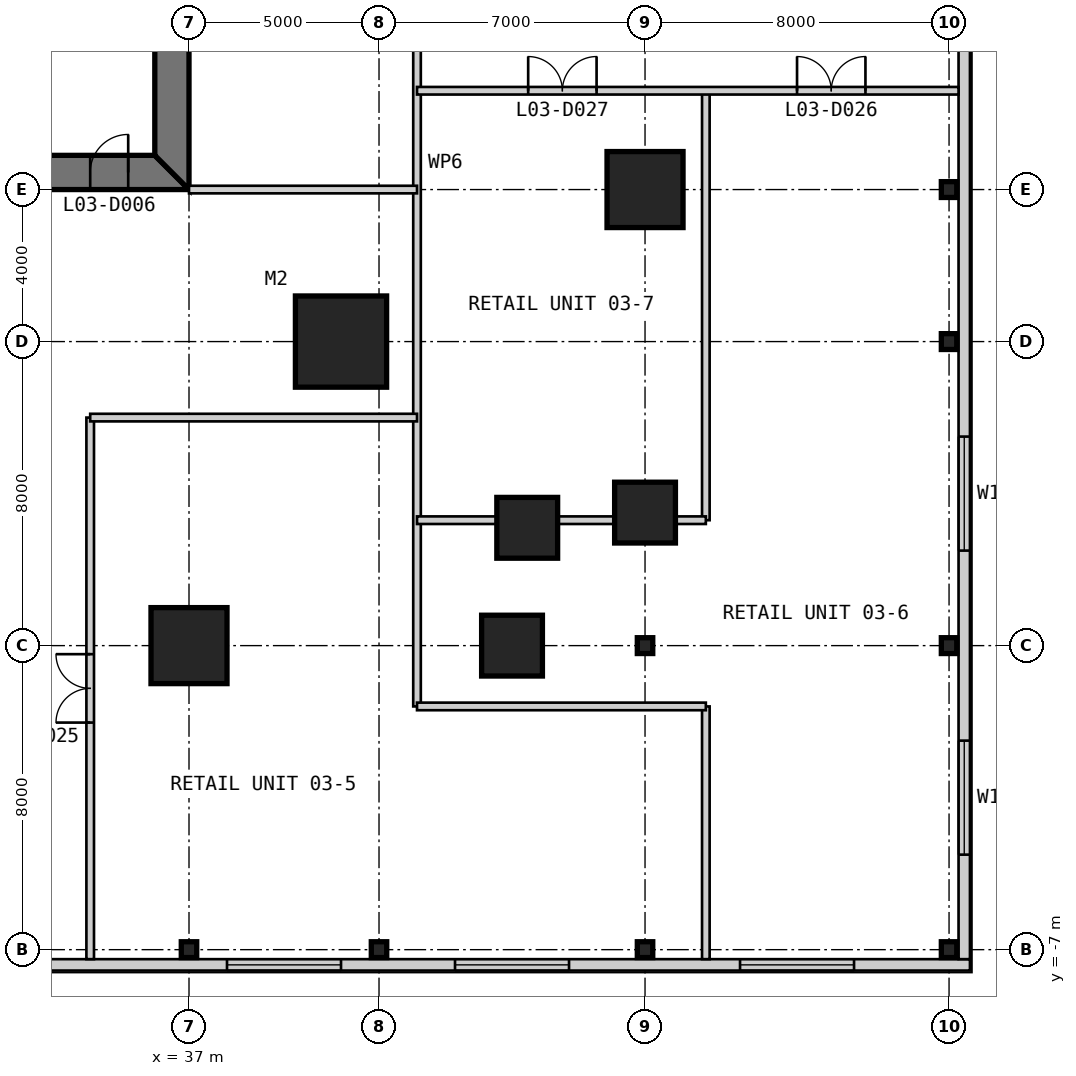
"""IFC4 building model, lengths in metres.
Left out: names, types, materials, properties, quantities, classifications, styles, units other than length and angle.
Written with IfcOpenShell. Run it as: python <this file> out.ifc"""

import sys

from ifc_helpers import new_model, si_unit, direction, frame, frame_2d, origin, origin_2d, place, context, subcontext, project, spatial, polyline, rectangle, i_section, outline, extrude, element, fill, save


model = new_model("IFC4")
c1 = context("Model", 3, precision=1e-05, world=origin(), true_north=direction((0.0, 1.0)))
c2 = subcontext(c1, "Body", "Model", "MODEL_VIEW")
j1 = project(units=[si_unit("LENGTHUNIT", "METRE"), si_unit("PLANEANGLEUNIT", "RADIAN")], contexts=[c1])
p1 = place(None, origin())
s1 = spatial("IfcSite", under=j1, at=p1, CompositionType="ELEMENT")
p2 = place(p1, origin())
s2 = spatial("IfcBuilding", under=s1, at=p2, CompositionType="ELEMENT")
p3 = place(p2, frame((0.0, 0.0, 16.6)))
s3 = spatial("IfcBuildingStorey", under=s2, at=p3, CompositionType="ELEMENT", Elevation=16.6)
p4 = place(p3, frame((41.0, 9.0, 0.0), z_axis=(0.0, 0.0, 1.0), x_axis=(1.0, 0.0, 0.0)))
e1 = element("IfcColumn", 1, at=p4, inside=s3, PredefinedType="COLUMN", context=c2, shape_type="SweptSolid", body=[
    extrude(rectangle(XDim=2.4, YDim=2.4, at=origin_2d()), origin(), (0.0, 0.0, 1.0), 4.8),
])
p5 = place(p3, frame((37.0, 1.0, 0.0), z_axis=(0.0, 0.0, 1.0), x_axis=(1.0, 0.0, 0.0)))
e2 = element("IfcColumn", 2, at=p5, inside=s3, PredefinedType="COLUMN", context=c2, shape_type="SweptSolid", body=[
    extrude(rectangle(XDim=2.0, YDim=2.0, at=origin_2d()), origin(), (0.0, 0.0, 1.0), 4.8),
])
for number, where, z_axis, x_axis in (
    (3, (45.5, 1.0, 0.0), (0.0, 0.0, 1.0), (1.0, 0.0, 0.0)),
    (4, (45.9, 4.1, 0.0), (0.0, 0.0, 1.0), (1.0, 0.0, 0.0)),
    (5, (49.0, 4.5, 0.0), (0.0, 0.0, 1.0), (1.0, 0.0, 0.0)),
):
    element("IfcColumn", number, at=place(p3, frame(where, z_axis=z_axis, x_axis=x_axis)), inside=s3, PredefinedType="COLUMN", context=c2, shape_type="SweptSolid", body=[
        extrude(rectangle(XDim=1.6, YDim=1.6, at=origin_2d()), origin(), (0.0, 0.0, 1.0), 4.8),
    ])
p6 = place(p3, frame((49.0, 13.0, 0.0), z_axis=(0.0, 0.0, 1.0), x_axis=(1.0, 0.0, 0.0)))
e6 = element("IfcColumn", 6, at=p6, inside=s3, PredefinedType="COLUMN", context=c2, shape_type="SweptSolid", body=[
    extrude(rectangle(XDim=2.0, YDim=2.0, at=origin_2d()), origin(), (0.0, 0.0, 1.0), 4.8),
])
for number, where, z_axis, x_axis in (
    (7, (37.0, -7.0, 0.0), (0.0, 0.0, 1.0), (1.0, 0.0, 0.0)),
    (8, (42.0, -7.0, 0.0), (0.0, 0.0, 1.0), (1.0, 0.0, 0.0)),
    (9, (49.0, -7.0, 0.0), (0.0, 0.0, 1.0), (1.0, 0.0, 0.0)),
    (10, (49.0, 1.0, 0.0), (0.0, 0.0, 1.0), (1.0, 0.0, 0.0)),
    (11, (57.0, -7.0, 0.0), (0.0, 0.0, 1.0), (1.0, 0.0, 0.0)),
    (12, (57.0, 1.0, 0.0), (0.0, 0.0, 1.0), (1.0, 0.0, 0.0)),
    (13, (57.0, 9.0, 0.0), (0.0, 0.0, 1.0), (1.0, 0.0, 0.0)),
    (14, (57.0, 13.0, 0.0), (0.0, 0.0, 1.0), (1.0, 0.0, 0.0)),
):
    element("IfcColumn", number, at=place(p3, frame(where, z_axis=z_axis, x_axis=x_axis)), inside=s3, PredefinedType="COLUMN", context=c2, shape_type="SweptSolid", body=[
        extrude(i_section(OverallWidth=0.406, OverallDepth=0.417, WebThickness=0.03, FlangeThickness=0.048, at=origin_2d()), origin(), (0.0, 0.0, 1.0), 4.8),
    ])
p7 = place(p3, frame((13.0, 13.45, 0.0), z_axis=(0.0, 0.0, 1.0), x_axis=(1.0, 0.0, 0.0)))
e15 = element("IfcWall", 15, at=p7, inside=s3, PredefinedType="SHEAR", context=c2, shape_type="SweptSolid", body=[
    extrude(outline(polyline([(0.0, -0.45), (24.0, -0.45), (23.1, 0.45), (0.9, 0.45), (0.0, -0.45)])), origin(), (0.0, 0.0, 1.0), 4.8),
])
p8 = place(p7, frame((4.9, 0.0, 0.0)))
e16 = element("IfcOpeningElement", 16, at=p8, cuts=e15, PredefinedType="OPENING", context=c2, shape_type="SweptSolid", body=[
    extrude(rectangle(XDim=1.0, YDim=2.2, at=frame_2d((0.5, 1.1))), frame((0.0, 0.46, 0.0), z_axis=(0.0, -1.0, 0.0), x_axis=(1.0, 0.0, 0.0)), (0.0, 0.0, 1.0), 0.92),
])
p9 = place(p7, frame((8.9, 0.0, 0.0)))
e17 = element("IfcOpeningElement", 17, at=p9, cuts=e15, PredefinedType="OPENING", context=c2, shape_type="SweptSolid", body=[
    extrude(rectangle(XDim=1.1, YDim=2.2, at=frame_2d((0.55, 1.1))), frame((0.0, 0.46, 0.0), z_axis=(0.0, -1.0, 0.0), x_axis=(1.0, 0.0, 0.0)), (0.0, 0.0, 1.0), 0.92),
])
p10 = place(p7, frame((15.05, 0.0, 0.0)))
e18 = element("IfcOpeningElement", 18, at=p10, cuts=e15, PredefinedType="OPENING", context=c2, shape_type="SweptSolid", body=[
    extrude(rectangle(XDim=0.9, YDim=2.2, at=frame_2d((0.45, 1.1))), frame((0.0, 0.46, 0.0), z_axis=(0.0, -1.0, 0.0), x_axis=(1.0, 0.0, 0.0)), (0.0, 0.0, 1.0), 0.92),
])
p11 = place(p7, frame((17.9, 0.0, 0.0)))
e19 = element("IfcOpeningElement", 19, at=p11, cuts=e15, PredefinedType="OPENING", context=c2, shape_type="SweptSolid", body=[
    extrude(rectangle(XDim=1.0, YDim=2.2, at=frame_2d((0.5, 1.1))), frame((0.0, 0.46, 0.0), z_axis=(0.0, -1.0, 0.0), x_axis=(1.0, 0.0, 0.0)), (0.0, 0.0, 1.0), 0.92),
])
p12 = place(p7, frame((21.4, 0.0, 0.0)))
e20 = element("IfcOpeningElement", 20, at=p12, cuts=e15, PredefinedType="OPENING", context=c2, shape_type="SweptSolid", body=[
    extrude(rectangle(XDim=1.0, YDim=2.2, at=frame_2d((0.5, 1.1))), frame((0.0, 0.46, 0.0), z_axis=(0.0, -1.0, 0.0), x_axis=(1.0, 0.0, 0.0)), (0.0, 0.0, 1.0), 0.92),
])
p13 = place(p3, frame((36.55, 13.9, 0.0), z_axis=(0.0, 0.0, 1.0), x_axis=(0.0, 1.0, 0.0)))
e21 = element("IfcWall", 21, at=p13, inside=s3, PredefinedType="SHEAR", context=c2, shape_type="SweptSolid", body=[
    extrude(outline(polyline([(-0.9, -0.45), (23.1, -0.45), (22.2, 0.45), (0.0, 0.45), (-0.9, -0.45)])), origin(), (0.0, 0.0, 1.0), 4.8),
])
p14 = place(p13, frame((20.2, 0.0, 0.0)))
e22 = element("IfcOpeningElement", 22, at=p14, cuts=e21, PredefinedType="OPENING", context=c2, shape_type="SweptSolid", body=[
    extrude(rectangle(XDim=1.0, YDim=2.2, at=frame_2d((0.5, 1.1))), frame((0.0, 0.46, 0.0), z_axis=(0.0, -1.0, 0.0), x_axis=(1.0, 0.0, 0.0)), (0.0, 0.0, 1.0), 0.92),
])
p15 = place(p13, frame((17.25, 0.0, 0.0)))
e23 = element("IfcOpeningElement", 23, at=p15, cuts=e21, PredefinedType="OPENING", context=c2, shape_type="SweptSolid", body=[
    extrude(rectangle(XDim=0.9, YDim=2.2, at=frame_2d((0.45, 1.1))), frame((0.0, 0.46, 0.0), z_axis=(0.0, -1.0, 0.0), x_axis=(1.0, 0.0, 0.0)), (0.0, 0.0, 1.0), 0.92),
])
p16 = place(p3, frame((-15.55, -7.4, 0.0), z_axis=(0.0, 0.0, 1.0), x_axis=(1.0, 0.0, 0.0)))
e24 = element("IfcWall", 24, at=p16, inside=s3, PredefinedType="SOLIDWALL", context=c2, shape_type="SweptSolid", body=[
    extrude(rectangle(XDim=73.1, YDim=0.3, at=frame_2d((36.55, 0.0))), origin(), (0.0, 0.0, 1.0), 4.5),
])
p17 = place(p16, frame((3.05, 0.0, 0.9)))
e25 = element("IfcOpeningElement", 25, at=p17, cuts=e24, PredefinedType="OPENING", context=c2, shape_type="SweptSolid", body=[
    extrude(rectangle(XDim=3.0, YDim=2.4, at=frame_2d((1.5, 1.2))), frame((0.0, 0.16, 0.0), z_axis=(0.0, -1.0, 0.0), x_axis=(1.0, 0.0, 0.0)), (0.0, 0.0, 1.0), 0.32),
])
p18 = place(p16, frame((11.05, 0.0, 0.9)))
e26 = element("IfcOpeningElement", 26, at=p18, cuts=e24, PredefinedType="OPENING", context=c2, shape_type="SweptSolid", body=[
    extrude(rectangle(XDim=3.0, YDim=2.4, at=frame_2d((1.5, 1.2))), frame((0.0, 0.16, 0.0), z_axis=(0.0, -1.0, 0.0), x_axis=(1.0, 0.0, 0.0)), (0.0, 0.0, 1.0), 0.32),
])
p19 = place(p16, frame((19.05, 0.0, 0.9)))
e27 = element("IfcOpeningElement", 27, at=p19, cuts=e24, PredefinedType="OPENING", context=c2, shape_type="SweptSolid", body=[
    extrude(rectangle(XDim=3.0, YDim=2.4, at=frame_2d((1.5, 1.2))), frame((0.0, 0.16, 0.0), z_axis=(0.0, -1.0, 0.0), x_axis=(1.0, 0.0, 0.0)), (0.0, 0.0, 1.0), 0.32),
])
p20 = place(p16, frame((33.05, 0.0, 0.9)))
e28 = element("IfcOpeningElement", 28, at=p20, cuts=e24, PredefinedType="OPENING", context=c2, shape_type="SweptSolid", body=[
    extrude(rectangle(XDim=3.0, YDim=2.4, at=frame_2d((1.5, 1.2))), frame((0.0, 0.16, 0.0), z_axis=(0.0, -1.0, 0.0), x_axis=(1.0, 0.0, 0.0)), (0.0, 0.0, 1.0), 0.32),
])
p21 = place(p16, frame((45.05, 0.0, 0.9)))
e29 = element("IfcOpeningElement", 29, at=p21, cuts=e24, PredefinedType="OPENING", context=c2, shape_type="SweptSolid", body=[
    extrude(rectangle(XDim=3.0, YDim=2.4, at=frame_2d((1.5, 1.2))), frame((0.0, 0.16, 0.0), z_axis=(0.0, -1.0, 0.0), x_axis=(1.0, 0.0, 0.0)), (0.0, 0.0, 1.0), 0.32),
])
p22 = place(p16, frame((53.55, 0.0, 0.9)))
e30 = element("IfcOpeningElement", 30, at=p22, cuts=e24, PredefinedType="OPENING", context=c2, shape_type="SweptSolid", body=[
    extrude(rectangle(XDim=3.0, YDim=2.4, at=frame_2d((1.5, 1.2))), frame((0.0, 0.16, 0.0), z_axis=(0.0, -1.0, 0.0), x_axis=(1.0, 0.0, 0.0)), (0.0, 0.0, 1.0), 0.32),
])
p23 = place(p16, frame((59.55, 0.0, 0.9)))
e31 = element("IfcOpeningElement", 31, at=p23, cuts=e24, PredefinedType="OPENING", context=c2, shape_type="SweptSolid", body=[
    extrude(rectangle(XDim=3.0, YDim=2.4, at=frame_2d((1.5, 1.2))), frame((0.0, 0.16, 0.0), z_axis=(0.0, -1.0, 0.0), x_axis=(1.0, 0.0, 0.0)), (0.0, 0.0, 1.0), 0.32),
])
p24 = place(p16, frame((67.05, 0.0, 0.9)))
e32 = element("IfcOpeningElement", 32, at=p24, cuts=e24, PredefinedType="OPENING", context=c2, shape_type="SweptSolid", body=[
    extrude(rectangle(XDim=3.0, YDim=2.4, at=frame_2d((1.5, 1.2))), frame((0.0, 0.16, 0.0), z_axis=(0.0, -1.0, 0.0), x_axis=(1.0, 0.0, 0.0)), (0.0, 0.0, 1.0), 0.32),
])
p25 = place(p3, frame((57.4, -7.25, 0.0), z_axis=(0.0, 0.0, 1.0), x_axis=(0.0, 1.0, 0.0)))
e33 = element("IfcWall", 33, at=p25, inside=s3, PredefinedType="SOLIDWALL", context=c2, shape_type="SweptSolid", body=[
    extrude(rectangle(XDim=72.5, YDim=0.3, at=frame_2d((36.25, 0.0))), origin(), (0.0, 0.0, 1.0), 4.5),
])
p26 = place(p25, frame((2.75, 0.0, 0.9)))
e34 = element("IfcOpeningElement", 34, at=p26, cuts=e33, PredefinedType="OPENING", context=c2, shape_type="SweptSolid", body=[
    extrude(rectangle(XDim=3.0, YDim=2.4, at=frame_2d((1.5, 1.2))), frame((0.0, 0.16, 0.0), z_axis=(0.0, -1.0, 0.0), x_axis=(1.0, 0.0, 0.0)), (0.0, 0.0, 1.0), 0.32),
])
p27 = place(p25, frame((10.75, 0.0, 0.9)))
e35 = element("IfcOpeningElement", 35, at=p27, cuts=e33, PredefinedType="OPENING", context=c2, shape_type="SweptSolid", body=[
    extrude(rectangle(XDim=3.0, YDim=2.4, at=frame_2d((1.5, 1.2))), frame((0.0, 0.16, 0.0), z_axis=(0.0, -1.0, 0.0), x_axis=(1.0, 0.0, 0.0)), (0.0, 0.0, 1.0), 0.32),
])
p28 = place(p25, frame((24.75, 0.0, 0.9)))
e36 = element("IfcOpeningElement", 36, at=p28, cuts=e33, PredefinedType="OPENING", context=c2, shape_type="SweptSolid", body=[
    extrude(rectangle(XDim=3.0, YDim=2.4, at=frame_2d((1.5, 1.2))), frame((0.0, 0.16, 0.0), z_axis=(0.0, -1.0, 0.0), x_axis=(1.0, 0.0, 0.0)), (0.0, 0.0, 1.0), 0.32),
])
p29 = place(p25, frame((36.75, 0.0, 0.9)))
e37 = element("IfcOpeningElement", 37, at=p29, cuts=e33, PredefinedType="OPENING", context=c2, shape_type="SweptSolid", body=[
    extrude(rectangle(XDim=3.0, YDim=2.4, at=frame_2d((1.5, 1.2))), frame((0.0, 0.16, 0.0), z_axis=(0.0, -1.0, 0.0), x_axis=(1.0, 0.0, 0.0)), (0.0, 0.0, 1.0), 0.32),
])
p30 = place(p25, frame((45.25, 0.0, 0.9)))
e38 = element("IfcOpeningElement", 38, at=p30, cuts=e33, PredefinedType="OPENING", context=c2, shape_type="SweptSolid", body=[
    extrude(rectangle(XDim=3.0, YDim=2.4, at=frame_2d((1.5, 1.2))), frame((0.0, 0.16, 0.0), z_axis=(0.0, -1.0, 0.0), x_axis=(1.0, 0.0, 0.0)), (0.0, 0.0, 1.0), 0.32),
])
p31 = place(p25, frame((51.25, 0.0, 0.9)))
e39 = element("IfcOpeningElement", 39, at=p31, cuts=e33, PredefinedType="OPENING", context=c2, shape_type="SweptSolid", body=[
    extrude(rectangle(XDim=3.0, YDim=2.4, at=frame_2d((1.5, 1.2))), frame((0.0, 0.16, 0.0), z_axis=(0.0, -1.0, 0.0), x_axis=(1.0, 0.0, 0.0)), (0.0, 0.0, 1.0), 0.32),
])
p32 = place(p25, frame((58.75, 0.0, 0.9)))
e40 = element("IfcOpeningElement", 40, at=p32, cuts=e33, PredefinedType="OPENING", context=c2, shape_type="SweptSolid", body=[
    extrude(rectangle(XDim=3.0, YDim=2.4, at=frame_2d((1.5, 1.2))), frame((0.0, 0.16, 0.0), z_axis=(0.0, -1.0, 0.0), x_axis=(1.0, 0.0, 0.0)), (0.0, 0.0, 1.0), 0.32),
])
p33 = place(p25, frame((66.75, 0.0, 0.9)))
e41 = element("IfcOpeningElement", 41, at=p33, cuts=e33, PredefinedType="OPENING", context=c2, shape_type="SweptSolid", body=[
    extrude(rectangle(XDim=3.0, YDim=2.4, at=frame_2d((1.5, 1.2))), frame((0.0, 0.16, 0.0), z_axis=(0.0, -1.0, 0.0), x_axis=(1.0, 0.0, 0.0)), (0.0, 0.0, 1.0), 0.32),
])
p34 = place(p3, frame((34.4, -7.25, 0.0), z_axis=(0.0, 0.0, 1.0), x_axis=(0.0, 1.0, 0.0)))
e42 = element("IfcWall", 42, at=p34, inside=s3, PredefinedType="PARTITIONING", context=c2, shape_type="SweptSolid", body=[
    extrude(rectangle(XDim=14.25, YDim=0.2, at=frame_2d((7.125, 0.0))), origin(), (0.0, 0.0, 1.0), 4.5),
])
p35 = place(p34, frame((6.225, 0.0, 0.0)))
e43 = element("IfcOpeningElement", 43, at=p35, cuts=e42, PredefinedType="OPENING", context=c2, shape_type="SweptSolid", body=[
    extrude(rectangle(XDim=1.8, YDim=2.4, at=frame_2d((0.9, 1.2))), frame((0.0, 0.11, 0.0), z_axis=(0.0, -1.0, 0.0), x_axis=(1.0, 0.0, 0.0)), (0.0, 0.0, 1.0), 0.22),
])
p36 = place(p3, frame((43.0, -0.6, 0.0), z_axis=(0.0, 0.0, 1.0), x_axis=(0.0, 1.0, 0.0)))
e44 = element("IfcWall", 44, at=p36, inside=s3, PredefinedType="PARTITIONING", context=c2, shape_type="SweptSolid", body=[
    extrude(rectangle(XDim=28.6, YDim=0.2, at=frame_2d((14.3, 0.0))), origin(), (0.0, 0.0, 1.0), 3.843),
])
p37 = place(p3, frame((50.6, -7.25, 0.0), z_axis=(0.0, 0.0, 1.0), x_axis=(0.0, 1.0, 0.0)))
e45 = element("IfcWall", 45, at=p37, inside=s3, PredefinedType="PARTITIONING", context=c2, shape_type="SweptSolid", body=[
    extrude(rectangle(XDim=6.65, YDim=0.2, at=frame_2d((3.325, 0.0))), origin(), (0.0, 0.0, 1.0), 4.5),
])
p38 = place(p3, frame((50.6, 4.3, 0.0), z_axis=(0.0, 0.0, 1.0), x_axis=(0.0, 1.0, 0.0)))
e46 = element("IfcWall", 46, at=p38, inside=s3, PredefinedType="PARTITIONING", context=c2, shape_type="SweptSolid", body=[
    extrude(rectangle(XDim=11.3, YDim=0.2, at=frame_2d((5.65, 0.0))), origin(), (0.0, 0.0, 1.0), 4.5),
])
p39 = place(p3, frame((43.0, -0.6, 0.0), z_axis=(0.0, 0.0, 1.0), x_axis=(1.0, 0.0, 0.0)))
e47 = element("IfcWall", 47, at=p39, inside=s3, PredefinedType="PARTITIONING", context=c2, shape_type="SweptSolid", body=[
    extrude(rectangle(XDim=7.6, YDim=0.2, at=frame_2d((3.8, 0.0))), origin(), (0.0, 0.0, 1.0), 4.5),
])
p40 = place(p3, frame((43.0, 4.3, 0.0), z_axis=(0.0, 0.0, 1.0), x_axis=(1.0, 0.0, 0.0)))
e48 = element("IfcWall", 48, at=p40, inside=s3, PredefinedType="PARTITIONING", context=c2, shape_type="SweptSolid", body=[
    extrude(rectangle(XDim=2.1, YDim=0.2, at=frame_2d((1.05, 0.0))), origin(), (0.0, 0.0, 1.0), 4.5),
])
p41 = place(p3, frame((46.7, 4.3, 0.0), z_axis=(0.0, 0.0, 1.0), x_axis=(1.0, 0.0, 0.0)))
e49 = element("IfcWall", 49, at=p41, inside=s3, PredefinedType="PARTITIONING", context=c2, shape_type="SweptSolid", body=[
    extrude(rectangle(XDim=1.5, YDim=0.2, at=frame_2d((0.75, 0.0))), origin(), (0.0, 0.0, 1.0), 3.65),
])
p42 = place(p3, frame((49.8, 4.3, 0.0), z_axis=(0.0, 0.0, 1.0), x_axis=(1.0, 0.0, 0.0)))
e50 = element("IfcWall", 50, at=p42, inside=s3, PredefinedType="PARTITIONING", context=c2, shape_type="SweptSolid", body=[
    extrude(rectangle(XDim=0.8, YDim=0.2, at=frame_2d((0.4, 0.0))), origin(), (0.0, 0.0, 1.0), 4.5),
])
p43 = place(p3, frame((34.4, 7.0, 0.0), z_axis=(0.0, 0.0, 1.0), x_axis=(1.0, 0.0, 0.0)))
e51 = element("IfcWall", 51, at=p43, inside=s3, PredefinedType="PARTITIONING", context=c2, shape_type="SweptSolid", body=[
    extrude(rectangle(XDim=8.6, YDim=0.2, at=frame_2d((4.3, 0.0))), origin(), (0.0, 0.0, 1.0), 4.5),
])
p44 = place(p3, frame((37.0, 13.0, 0.0), z_axis=(0.0, 0.0, 1.0), x_axis=(1.0, 0.0, 0.0)))
e52 = element("IfcWall", 52, at=p44, inside=s3, PredefinedType="PARTITIONING", context=c2, shape_type="SweptSolid", body=[
    extrude(rectangle(XDim=6.0, YDim=0.2, at=frame_2d((3.0, 0.0))), origin(), (0.0, 0.0, 1.0), 3.653),
])
p45 = place(p3, frame((43.0, 15.6, 0.0), z_axis=(0.0, 0.0, 1.0), x_axis=(1.0, 0.0, 0.0)))
e53 = element("IfcWall", 53, at=p45, inside=s3, PredefinedType="PARTITIONING", context=c2, shape_type="SweptSolid", body=[
    extrude(rectangle(XDim=14.25, YDim=0.2, at=frame_2d((7.125, 0.0))), origin(), (0.0, 0.0, 1.0), 4.5),
])
p46 = place(p45, frame((10.0, 0.0, 0.0)))
e54 = element("IfcOpeningElement", 54, at=p46, cuts=e53, PredefinedType="OPENING", context=c2, shape_type="SweptSolid", body=[
    extrude(rectangle(XDim=1.8, YDim=2.4, at=frame_2d((0.9, 1.2))), frame((0.0, 0.11, 0.0), z_axis=(0.0, -1.0, 0.0), x_axis=(1.0, 0.0, 0.0)), (0.0, 0.0, 1.0), 0.22),
])
p47 = place(p45, frame((2.925, 0.0, 0.0)))
e55 = element("IfcOpeningElement", 55, at=p47, cuts=e53, PredefinedType="OPENING", context=c2, shape_type="SweptSolid", body=[
    extrude(rectangle(XDim=1.8, YDim=2.4, at=frame_2d((0.9, 1.2))), frame((0.0, 0.11, 0.0), z_axis=(0.0, -1.0, 0.0), x_axis=(1.0, 0.0, 0.0)), (0.0, 0.0, 1.0), 0.22),
])
p48 = place(p22, origin())
e56 = element("IfcWindow", 56, at=p48, inside=s3, PartitioningType="SINGLE_PANEL", PredefinedType="WINDOW", context=c2, shape_type="SweptSolid", body=[
    extrude(rectangle(XDim=3.0, YDim=2.4, at=frame_2d((1.5, 1.2))), frame((0.0, 0.03, 0.0), z_axis=(0.0, -1.0, 0.0), x_axis=(1.0, 0.0, 0.0)), (0.0, 0.0, 1.0), 0.06),
])
fill(e30, e56)
p49 = place(p23, origin())
e57 = element("IfcWindow", 57, at=p49, inside=s3, PartitioningType="SINGLE_PANEL", PredefinedType="WINDOW", context=c2, shape_type="SweptSolid", body=[
    extrude(rectangle(XDim=3.0, YDim=2.4, at=frame_2d((1.5, 1.2))), frame((0.0, 0.03, 0.0), z_axis=(0.0, -1.0, 0.0), x_axis=(1.0, 0.0, 0.0)), (0.0, 0.0, 1.0), 0.06),
])
fill(e31, e57)
p50 = place(p24, origin())
e58 = element("IfcWindow", 58, at=p50, inside=s3, PartitioningType="SINGLE_PANEL", PredefinedType="WINDOW", context=c2, shape_type="SweptSolid", body=[
    extrude(rectangle(XDim=3.0, YDim=2.4, at=frame_2d((1.5, 1.2))), frame((0.0, 0.03, 0.0), z_axis=(0.0, -1.0, 0.0), x_axis=(1.0, 0.0, 0.0)), (0.0, 0.0, 1.0), 0.06),
])
fill(e32, e58)
p51 = place(p26, origin())
e59 = element("IfcWindow", 59, at=p51, inside=s3, PartitioningType="SINGLE_PANEL", PredefinedType="WINDOW", context=c2, shape_type="SweptSolid", body=[
    extrude(rectangle(XDim=3.0, YDim=2.4, at=frame_2d((1.5, 1.2))), frame((0.0, 0.03, 0.0), z_axis=(0.0, -1.0, 0.0), x_axis=(1.0, 0.0, 0.0)), (0.0, 0.0, 1.0), 0.06),
])
fill(e34, e59)
p52 = place(p27, origin())
e60 = element("IfcWindow", 60, at=p52, inside=s3, PartitioningType="SINGLE_PANEL", PredefinedType="WINDOW", context=c2, shape_type="SweptSolid", body=[
    extrude(rectangle(XDim=3.0, YDim=2.4, at=frame_2d((1.5, 1.2))), frame((0.0, 0.03, 0.0), z_axis=(0.0, -1.0, 0.0), x_axis=(1.0, 0.0, 0.0)), (0.0, 0.0, 1.0), 0.06),
])
fill(e35, e60)
p53 = place(p12, origin())
e61 = element("IfcDoor", 61, at=p53, inside=s3, OperationType="SINGLE_SWING_RIGHT", PredefinedType="DOOR", context=c2, shape_type="SweptSolid", body=[
    extrude(rectangle(XDim=1.0, YDim=2.2, at=frame_2d((0.5, 1.1))), frame((0.0, 0.025, 0.0), z_axis=(0.0, -1.0, 0.0), x_axis=(1.0, 0.0, 0.0)), (0.0, 0.0, 1.0), 0.05),
    extrude(outline(polyline([(0.0, 0.0), (0.04, 0.0), (0.04, 2.16), (0.96, 2.16), (0.96, 0.0), (1.0, 0.0), (1.0, 2.2), (0.0, 2.2), (0.0, 0.0)])), frame((0.0, 0.3, 0.0), z_axis=(0.0, -1.0, 0.0), x_axis=(1.0, 0.0, 0.0)), (0.0, 0.0, 1.0), 0.6),
])
fill(e20, e61)
p54 = place(p35, origin())
e62 = element("IfcDoor", 62, at=p54, inside=s3, OperationType="DOUBLE_DOOR_SINGLE_SWING", PredefinedType="DOOR", context=c2, shape_type="SweptSolid", body=[
    extrude(rectangle(XDim=1.8, YDim=2.4, at=frame_2d((0.9, 1.2))), frame((0.0, 0.025, 0.0), z_axis=(0.0, -1.0, 0.0), x_axis=(1.0, 0.0, 0.0)), (0.0, 0.0, 1.0), 0.05),
])
fill(e43, e62)
p55 = place(p46, origin())
e63 = element("IfcDoor", 63, at=p55, inside=s3, OperationType="DOUBLE_DOOR_SINGLE_SWING", PredefinedType="DOOR", context=c2, shape_type="SweptSolid", body=[
    extrude(rectangle(XDim=1.8, YDim=2.4, at=frame_2d((0.9, 1.2))), frame((0.0, 0.025, 0.0), z_axis=(0.0, -1.0, 0.0), x_axis=(1.0, 0.0, 0.0)), (0.0, 0.0, 1.0), 0.05),
])
fill(e54, e63)
p56 = place(p47, origin())
e64 = element("IfcDoor", 64, at=p56, inside=s3, OperationType="DOUBLE_DOOR_SINGLE_SWING", PredefinedType="DOOR", context=c2, shape_type="SweptSolid", body=[
    extrude(rectangle(XDim=1.8, YDim=2.4, at=frame_2d((0.9, 1.2))), frame((0.0, 0.025, 0.0), z_axis=(0.0, -1.0, 0.0), x_axis=(1.0, 0.0, 0.0)), (0.0, 0.0, 1.0), 0.05),
])
fill(e55, e64)
save(model, sys.argv[1])
